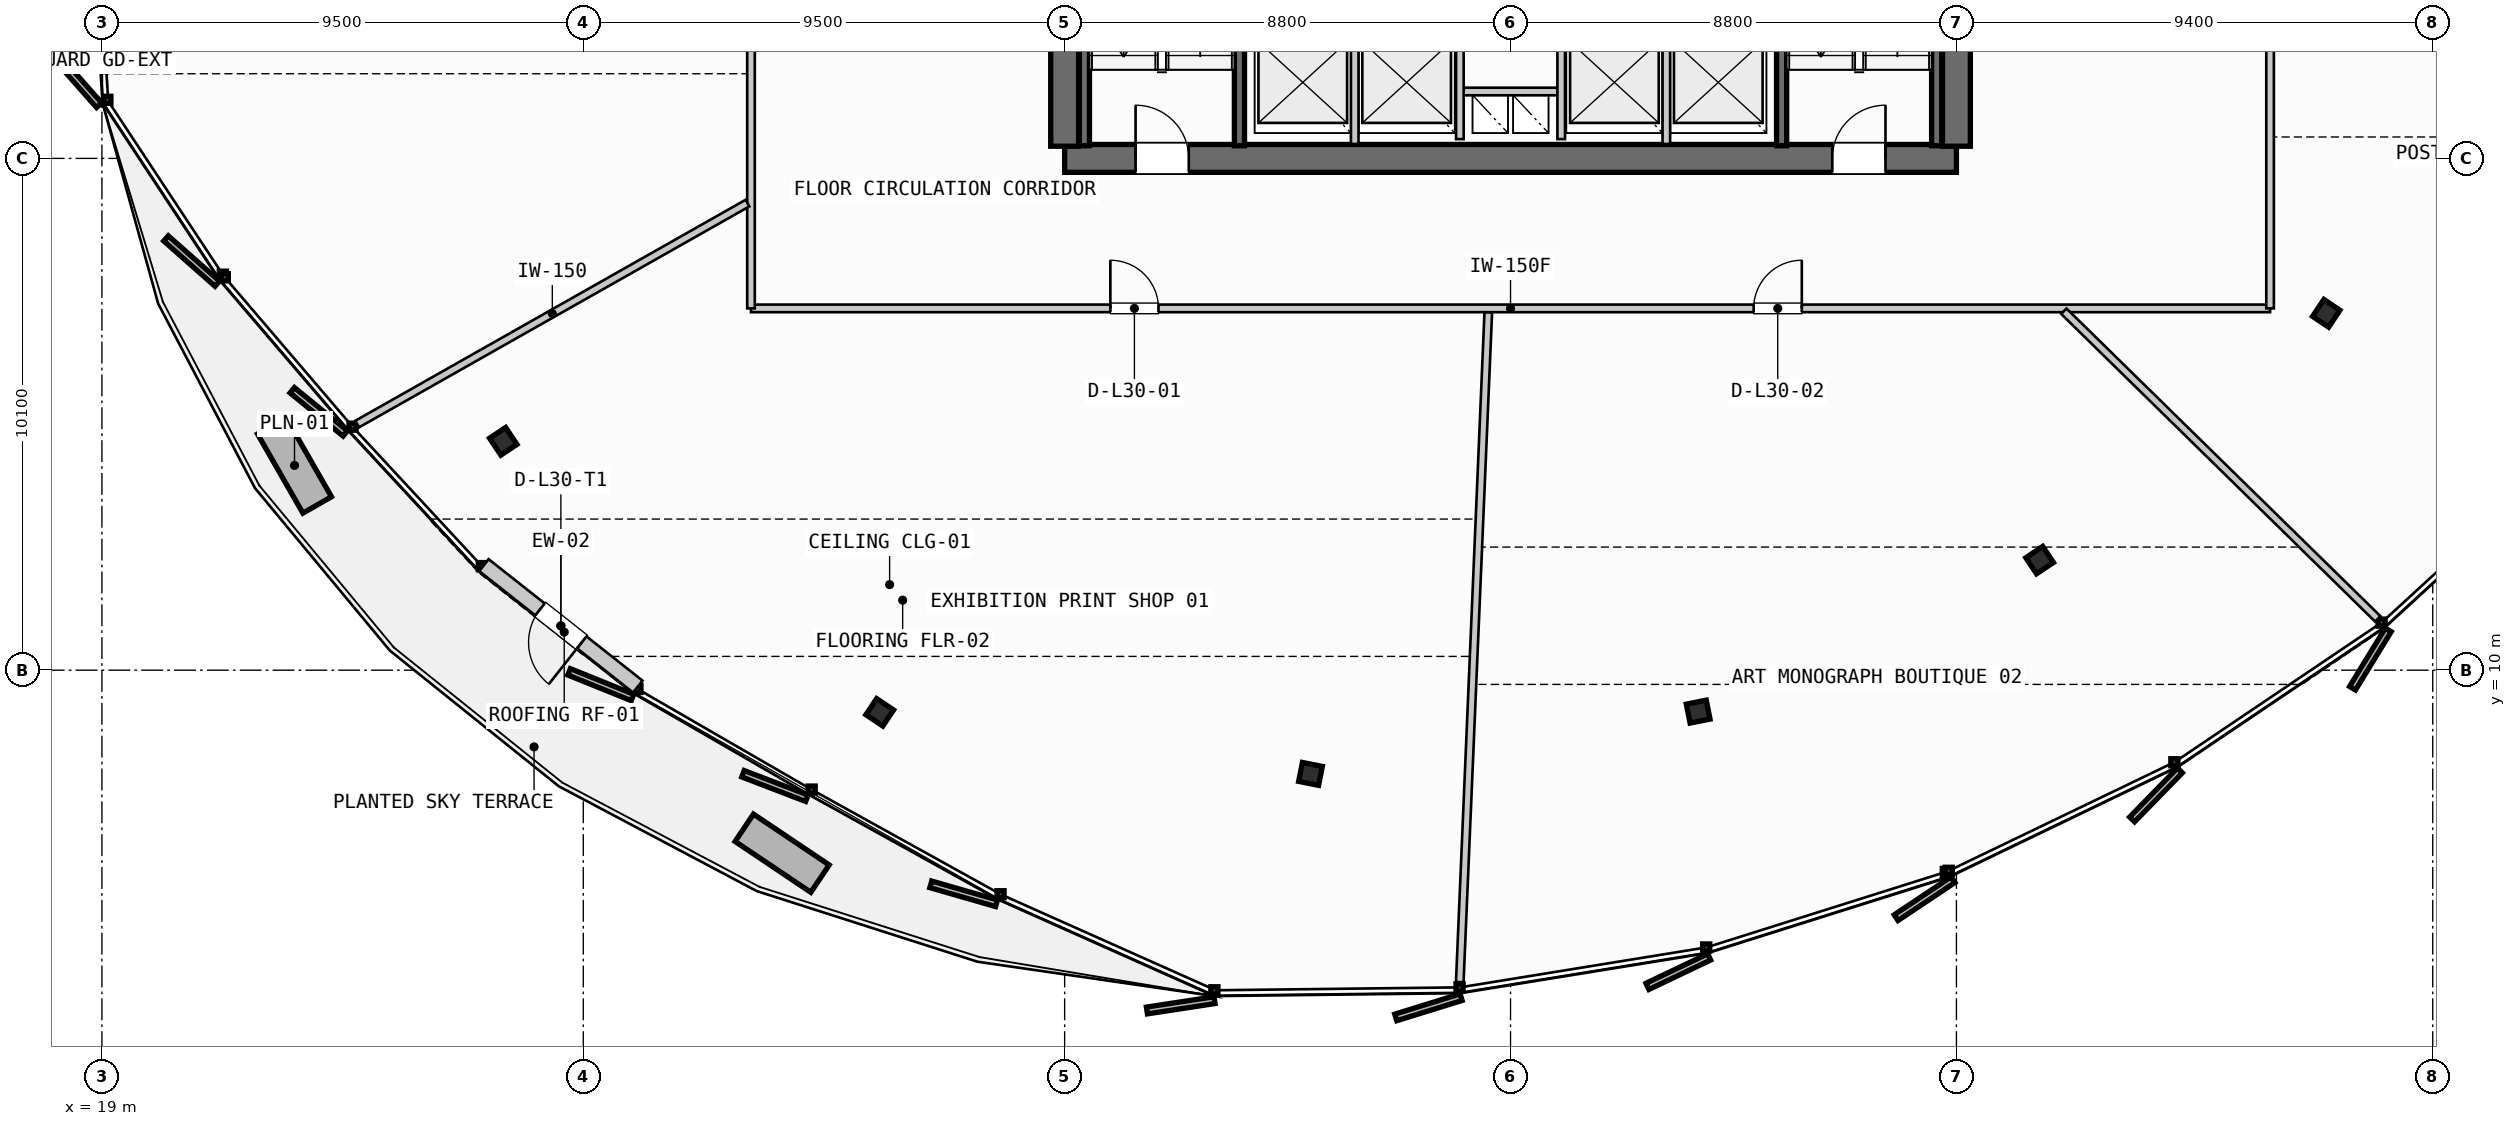
"""IFC4 building model, lengths in metres.
Left out: names, types, materials, properties, quantities, classifications, styles, units other than length and angle.
Written with IfcOpenShell. Run it as: python <this file> out.ifc"""

import sys

from ifc_helpers import new_model, si_unit, direction, frame, frame_2d, origin, origin_2d, place, context, subcontext, project, spatial, rectangle, i_section, extrude, source, transform, mapped, element, fill, save


model = new_model("IFC4")
c1 = context("Model", 3, precision=1e-05, world=origin(), true_north=direction((0.0, 1.0)))
c2 = subcontext(c1, "Body", "Model", "MODEL_VIEW")
j1 = project(units=[si_unit("LENGTHUNIT", "METRE"), si_unit("PLANEANGLEUNIT", "RADIAN")], contexts=[c1])
p1 = place(None, origin())
s1 = spatial("IfcSite", under=j1, at=p1, CompositionType="ELEMENT")
p2 = place(p1, origin())
s2 = spatial("IfcBuilding", under=s1, at=p2, CompositionType="ELEMENT")
p3 = place(p2, frame((0.0, 0.0, 121.6)))
s3 = spatial("IfcBuildingStorey", under=s2, at=p3, CompositionType="ELEMENT", Elevation=121.6)
p4 = place(p3, frame((38.0, 20.1, 0.0), z_axis=(0.0, 0.0, 1.0), x_axis=(1.0, 0.0, 0.0)))
e1 = element("IfcWall", 1, at=p4, inside=s3, PredefinedType="SHEAR", context=c2, shape_type="SweptSolid", body=[
    extrude(rectangle(XDim=17.6, YDim=0.55, at=frame_2d((8.8, 0.0))), origin(), (0.0, 0.0, 1.0), 3.35),
])
p5 = place(p4, frame((1.4, 0.0, 0.0)))
e2 = element("IfcOpeningElement", 2, at=p5, cuts=e1, PredefinedType="OPENING", context=c2, shape_type="SweptSolid", body=[
    extrude(rectangle(XDim=1.05, YDim=2.15, at=frame_2d((0.525, 1.075))), frame((0.0, 0.285, 0.0), z_axis=(0.0, -1.0, 0.0), x_axis=(1.0, 0.0, 0.0)), (0.0, 0.0, 1.0), 0.57),
])
p6 = place(p4, frame((15.15, 0.0, 0.0)))
e3 = element("IfcOpeningElement", 3, at=p6, cuts=e1, PredefinedType="OPENING", context=c2, shape_type="SweptSolid", body=[
    extrude(rectangle(XDim=1.05, YDim=2.15, at=frame_2d((0.525, 1.075))), frame((0.0, 0.285, 0.0), z_axis=(0.0, -1.0, 0.0), x_axis=(1.0, 0.0, 0.0)), (0.0, 0.0, 1.0), 0.57),
])
p7 = place(p3, frame((38.0, 35.26, 0.0), z_axis=(0.0, 0.0, 1.0), x_axis=(0.0, -1.0, 0.0)))
e4 = element("IfcWall", 4, at=p7, inside=s3, PredefinedType="SHEAR", context=c2, shape_type="SweptSolid", body=[
    extrude(rectangle(XDim=14.92, YDim=0.55, at=frame_2d((7.46, 0.0))), origin(), (0.0, 0.0, 1.0), 3.35),
])
p8 = place(p7, frame((5.21, 0.0, 0.0)))
e5 = element("IfcOpeningElement", 5, at=p8, cuts=e4, PredefinedType="OPENING", context=c2, shape_type="SweptSolid", body=[
    extrude(rectangle(XDim=1.1, YDim=2.2, at=frame_2d((0.55, 1.1))), frame((0.0, 0.285, 0.0), z_axis=(0.0, -1.0, 0.0), x_axis=(1.0, 0.0, 0.0)), (0.0, 0.0, 1.0), 0.57),
])
p9 = place(p3, frame((55.6, 20.34, 0.0), z_axis=(0.0, 0.0, 1.0), x_axis=(0.0, 1.0, 0.0)))
e6 = element("IfcWall", 6, at=p9, inside=s3, PredefinedType="SHEAR", context=c2, shape_type="SweptSolid", body=[
    extrude(rectangle(XDim=14.92, YDim=0.55, at=frame_2d((7.46, 0.0))), origin(), (0.0, 0.0, 1.0), 3.35),
])
p10 = place(p9, frame((12.71, 0.0, 0.0)))
e7 = element("IfcOpeningElement", 7, at=p10, cuts=e6, PredefinedType="OPENING", context=c2, shape_type="SweptSolid", body=[
    extrude(rectangle(XDim=1.05, YDim=2.15, at=frame_2d((0.525, 1.075))), frame((0.0, 0.285, 0.0), z_axis=(0.0, -1.0, 0.0), x_axis=(1.0, 0.0, 0.0)), (0.0, 0.0, 1.0), 0.57),
])
p11 = place(p9, frame((8.61, 0.0, 0.0)))
e8 = element("IfcOpeningElement", 8, at=p11, cuts=e6, PredefinedType="OPENING", context=c2, shape_type="SweptSolid", body=[
    extrude(rectangle(XDim=1.1, YDim=2.2, at=frame_2d((0.55, 1.1))), frame((0.0, 0.285, 0.0), z_axis=(0.0, -1.0, 0.0), x_axis=(1.0, 0.0, 0.0)), (0.0, 0.0, 1.0), 0.57),
])
m1 = source(origin(), c2, "Body", "SweptSolid", [
    extrude(i_section(OverallWidth=0.401, OverallDepth=0.381, WebThickness=0.032, FlangeThickness=0.051, FilletRadius=0.015, at=origin_2d()), origin(), (0.0, 0.0, 1.0), 3.35),
])
for number, where, z_axis, x_axis in (
    (9, (26.921, 14.517, 0.0), (0.0, 0.0, 1.0), (-0.831, -0.556, 0.0)),
    (10, (34.351, 9.168, 0.0), (0.0, 0.0, 1.0), (-0.556, -0.831, 0.0)),
    (11, (42.852, 7.954, 0.0), (0.0, 0.0, 1.0), (-0.195, -0.981, 0.0)),
    (12, (50.503, 9.182, 0.0), (0.0, 0.0, 1.0), (0.195, -0.981, 0.0)),
    (13, (57.242, 12.172, 0.0), (0.0, 0.0, 1.0), (0.556, -0.831, 0.0)),
    (14, (62.899, 17.043, 0.0), (0.0, 0.0, 1.0), (0.831, -0.556, 0.0)),
):
    element("IfcColumn", number, at=place(p3, frame(where, z_axis=z_axis, x_axis=x_axis)), inside=s3, PredefinedType="COLUMN", context=c2, shape_type="MappedRepresentation", body=[
        mapped(m1, transform((0.0, 0.0, 0.0), scale=1.0)),
    ])
p12 = place(p3, frame((29.576, 9.676, 0.0), z_axis=(0.0, 0.0, 1.0), x_axis=(-0.785037813556, 0.61944784388, 0.0)))
e15 = element("IfcWall", 15, at=p12, inside=s3, PredefinedType="SOLIDWALL", context=c2, shape_type="SweptSolid", body=[
    extrude(rectangle(XDim=3.869, YDim=0.3, at=frame_2d((1.934, 0.0))), origin(), (0.0, 0.0, 1.0), 2.775),
])
p13 = place(p12, frame((1.409, 0.0, 0.0)))
e16 = element("IfcOpeningElement", 16, at=p13, cuts=e15, PredefinedType="OPENING", context=c2, shape_type="SweptSolid", body=[
    extrude(rectangle(XDim=1.05, YDim=2.2, at=frame_2d((0.525, 1.1))), frame((0.0, 0.16, 0.0), z_axis=(0.0, -1.0, 0.0), x_axis=(1.0, 0.0, 0.0)), (0.0, 0.0, 1.0), 0.32),
])
for number, where, z_axis, x_axis in (
    (17, (41.45, 27.7, 0.0), (0.0, 0.0, 1.0), (0.0, -1.0, 0.0)),
    (18, (38.39, 20.35, 0.0), (0.0, 0.0, 1.0), (0.0, 1.0, 0.0)),
    (19, (55.21, 27.7, 0.0), (0.0, 0.0, 1.0), (0.0, -1.0, 0.0)),
    (20, (52.15, 20.35, 0.0), (0.0, 0.0, 1.0), (0.0, 1.0, 0.0)),
):
    element("IfcWall", number, at=place(p3, frame(where, z_axis=z_axis, x_axis=x_axis)), inside=s3, PredefinedType="SHEAR", context=c2, shape_type="SweptSolid", body=[
        extrude(rectangle(XDim=7.35, YDim=0.2, at=frame_2d((3.675, 0.0))), origin(), (0.0, 0.0, 1.0), 3.35),
    ])
p14 = place(p3, frame((45.8, 21.42, 0.0), z_axis=(0.0, 0.0, 1.0), x_axis=(1.0, 0.0, 0.0)))
e21 = element("IfcWall", 21, at=p14, inside=s3, PredefinedType="PARTITIONING", context=c2, shape_type="SweptSolid", body=[
    extrude(rectangle(XDim=2.0, YDim=0.15, at=frame_2d((1.0, 0.0))), origin(), (0.0, 0.0, 1.0), 2.775),
])
for number, where, z_axis, x_axis in (
    (22, (45.8, 20.48, 0.0), (0.0, 0.0, 1.0), (0.0, 1.0, 0.0)),
    (23, (47.8, 20.48, 0.0), (0.0, 0.0, 1.0), (0.0, 1.0, 0.0)),
):
    element("IfcWall", number, at=place(p3, frame(where, z_axis=z_axis, x_axis=x_axis)), inside=s3, PredefinedType="PARTITIONING", context=c2, shape_type="SweptSolid", body=[
        extrude(rectangle(XDim=2.24, YDim=0.15, at=frame_2d((1.12, 0.0))), origin(), (0.0, 0.0, 1.0), 2.775),
    ])
for number, where, z_axis, x_axis in (
    (24, (43.725, 20.385, 0.0), (0.0, 0.0, 1.0), (0.0, 1.0, 0.0)),
    (25, (49.875, 20.385, 0.0), (0.0, 0.0, 1.0), (0.0, 1.0, 0.0)),
):
    element("IfcWall", number, at=place(p3, frame(where, z_axis=z_axis, x_axis=x_axis)), inside=s3, PredefinedType="PARTITIONING", context=c2, shape_type="SweptSolid", body=[
        extrude(rectangle(XDim=2.345, YDim=0.15, at=frame_2d((1.172, 0.0))), origin(), (0.0, 0.0, 1.0), 2.775),
    ])
p15 = place(p3, frame((31.81, 17.14, 0.0), z_axis=(0.0, 0.0, 1.0), x_axis=(1.0, 0.0, 0.0)))
e26 = element("IfcWall", 26, at=p15, inside=s3, PredefinedType="PARTITIONING", context=c2, shape_type="SweptSolid", body=[
    extrude(rectangle(XDim=29.98, YDim=0.15, at=frame_2d((14.99, 0.0))), origin(), (0.0, 0.0, 1.0), 2.775),
])
p16 = place(p15, frame((7.092, 0.0, 0.0)))
e27 = element("IfcOpeningElement", 27, at=p16, cuts=e26, PredefinedType="OPENING", context=c2, shape_type="SweptSolid", body=[
    extrude(rectangle(XDim=0.95, YDim=2.15, at=frame_2d((0.475, 1.075))), frame((0.0, 0.085, 0.0), z_axis=(0.0, -1.0, 0.0), x_axis=(1.0, 0.0, 0.0)), (0.0, 0.0, 1.0), 0.17),
])
p17 = place(p15, frame((19.789, 0.0, 0.0)))
e28 = element("IfcOpeningElement", 28, at=p17, cuts=e26, PredefinedType="OPENING", context=c2, shape_type="SweptSolid", body=[
    extrude(rectangle(XDim=0.95, YDim=2.15, at=frame_2d((0.475, 1.075))), frame((0.0, 0.085, 0.0), z_axis=(0.0, -1.0, 0.0), x_axis=(1.0, 0.0, 0.0)), (0.0, 0.0, 1.0), 0.17),
])
p18 = place(p3, frame((61.79, 17.14, 0.0), z_axis=(0.0, 0.0, 1.0), x_axis=(0.0, 1.0, 0.0)))
e29 = element("IfcWall", 29, at=p18, inside=s3, PredefinedType="PARTITIONING", context=c2, shape_type="SweptSolid", body=[
    extrude(rectangle(XDim=21.32, YDim=0.15, at=frame_2d((10.66, 0.0))), origin(), (0.0, 0.0, 1.0), 2.775),
])
p19 = place(p18, frame((5.8, 0.0, 0.0)))
e30 = element("IfcOpeningElement", 30, at=p19, cuts=e29, PredefinedType="OPENING", context=c2, shape_type="SweptSolid", body=[
    extrude(rectangle(XDim=0.95, YDim=2.15, at=frame_2d((0.475, 1.075))), frame((0.0, 0.085, 0.0), z_axis=(0.0, -1.0, 0.0), x_axis=(1.0, 0.0, 0.0)), (0.0, 0.0, 1.0), 0.17),
])
p20 = place(p18, frame((15.879, 0.0, 0.0)))
e31 = element("IfcOpeningElement", 31, at=p20, cuts=e29, PredefinedType="OPENING", context=c2, shape_type="SweptSolid", body=[
    extrude(rectangle(XDim=0.95, YDim=2.15, at=frame_2d((0.475, 1.075))), frame((0.0, 0.085, 0.0), z_axis=(0.0, -1.0, 0.0), x_axis=(1.0, 0.0, 0.0)), (0.0, 0.0, 1.0), 0.17),
])
p21 = place(p3, frame((31.81, 38.46, 0.0), z_axis=(0.0, 0.0, 1.0), x_axis=(0.0, -1.0, 0.0)))
e32 = element("IfcWall", 32, at=p21, inside=s3, PredefinedType="PARTITIONING", context=c2, shape_type="SweptSolid", body=[
    extrude(rectangle(XDim=21.32, YDim=0.15, at=frame_2d((10.66, 0.0))), origin(), (0.0, 0.0, 1.0), 2.775),
])
p22 = place(p21, frame((4.656, 0.0, 0.0)))
e33 = element("IfcOpeningElement", 33, at=p22, cuts=e32, PredefinedType="OPENING", context=c2, shape_type="SweptSolid", body=[
    extrude(rectangle(XDim=0.95, YDim=2.15, at=frame_2d((0.475, 1.075))), frame((0.0, 0.085, 0.0), z_axis=(0.0, -1.0, 0.0), x_axis=(1.0, 0.0, 0.0)), (0.0, 0.0, 1.0), 0.17),
])
p23 = place(p21, frame((13.989, 0.0, 0.0)))
e34 = element("IfcOpeningElement", 34, at=p23, cuts=e32, PredefinedType="OPENING", context=c2, shape_type="SweptSolid", body=[
    extrude(rectangle(XDim=0.95, YDim=2.15, at=frame_2d((0.475, 1.075))), frame((0.0, 0.085, 0.0), z_axis=(0.0, -1.0, 0.0), x_axis=(1.0, 0.0, 0.0)), (0.0, 0.0, 1.0), 0.17),
])
p24 = place(p3, frame((31.74, 19.218, 0.0), z_axis=(0.0, 0.0, 1.0), x_axis=(-0.870240569148, -0.492626990541, 0.0)))
e35 = element("IfcWall", 35, at=p24, inside=s3, PredefinedType="PARTITIONING", context=c2, shape_type="SweptSolid", body=[
    extrude(rectangle(XDim=8.852, YDim=0.15, at=frame_2d((4.426, 0.0))), origin(), (0.0, 0.0, 1.0), 2.775),
])
p25 = place(p3, frame((46.361, 17.06, 0.0), z_axis=(0.0, 0.0, 1.0), x_axis=(-0.042543332011, -0.999094622597, 0.0)))
e36 = element("IfcWall", 36, at=p25, inside=s3, PredefinedType="PARTITIONING", context=c2, shape_type="SweptSolid", body=[
    extrude(rectangle(XDim=13.228, YDim=0.15, at=frame_2d((6.614, 0.0))), origin(), (0.0, 0.0, 1.0), 2.775),
])
p26 = place(p3, frame((57.72, 17.084, 0.0), z_axis=(0.0, 0.0, 1.0), x_axis=(0.714233098237, -0.699907909215, 0.0)))
e37 = element("IfcWall", 37, at=p26, inside=s3, PredefinedType="PARTITIONING", context=c2, shape_type="SweptSolid", body=[
    extrude(rectangle(XDim=8.675, YDim=0.15, at=frame_2d((4.337, 0.0))), origin(), (0.0, 0.0, 1.0), 2.775),
])
m2 = source(origin(), c2, "Body", "SweptSolid", [
    extrude(rectangle(XDim=1.05, YDim=2.2, at=frame_2d((0.525, 1.1))), frame((0.0, 0.025, 0.0), z_axis=(0.0, -1.0, 0.0), x_axis=(1.0, 0.0, 0.0)), (0.0, 0.0, 1.0), 0.05),
])
p27 = place(p13, origin())
e38 = element("IfcDoor", 38, at=p27, inside=s3, OperationType="SINGLE_SWING_LEFT", PredefinedType="DOOR", context=c2, shape_type="MappedRepresentation", body=[
    mapped(m2, transform((0.0, 0.0, 0.0), scale=1.0)),
])
fill(e16, e38)
m3 = source(origin(), c2, "Body", "SweptSolid", [
    extrude(rectangle(XDim=1.05, YDim=2.15, at=frame_2d((0.525, 1.075))), frame((0.0, 0.025, 0.0), z_axis=(0.0, -1.0, 0.0), x_axis=(1.0, 0.0, 0.0)), (0.0, 0.0, 1.0), 0.05),
])
p28 = place(p5, origin())
e39 = element("IfcDoor", 39, at=p28, inside=s3, OperationType="SINGLE_SWING_LEFT", PredefinedType="DOOR", context=c2, shape_type="MappedRepresentation", body=[
    mapped(m3, transform((0.0, 0.0, 0.0), scale=1.0)),
])
fill(e2, e39)
p29 = place(p6, origin())
e40 = element("IfcDoor", 40, at=p29, inside=s3, OperationType="SINGLE_SWING_RIGHT", PredefinedType="DOOR", context=c2, shape_type="MappedRepresentation", body=[
    mapped(m3, transform((0.0, 0.0, 0.0), scale=1.0)),
])
fill(e3, e40)
m4 = source(origin(), c2, "Body", "SweptSolid", [
    extrude(rectangle(XDim=0.95, YDim=2.15, at=frame_2d((0.475, 1.075))), frame((0.0, 0.025, 0.0), z_axis=(0.0, -1.0, 0.0), x_axis=(1.0, 0.0, 0.0)), (0.0, 0.0, 1.0), 0.05),
])
p30 = place(p16, origin())
e41 = element("IfcDoor", 41, at=p30, inside=s3, OperationType="SINGLE_SWING_LEFT", PredefinedType="DOOR", context=c2, shape_type="MappedRepresentation", body=[
    mapped(m4, transform((0.0, 0.0, 0.0), scale=1.0)),
])
fill(e27, e41)
p31 = place(p17, origin())
e42 = element("IfcDoor", 42, at=p31, inside=s3, OperationType="SINGLE_SWING_RIGHT", PredefinedType="DOOR", context=c2, shape_type="MappedRepresentation", body=[
    mapped(m4, transform((0.0, 0.0, 0.0), scale=1.0)),
])
fill(e28, e42)
save(model, sys.argv[1])
